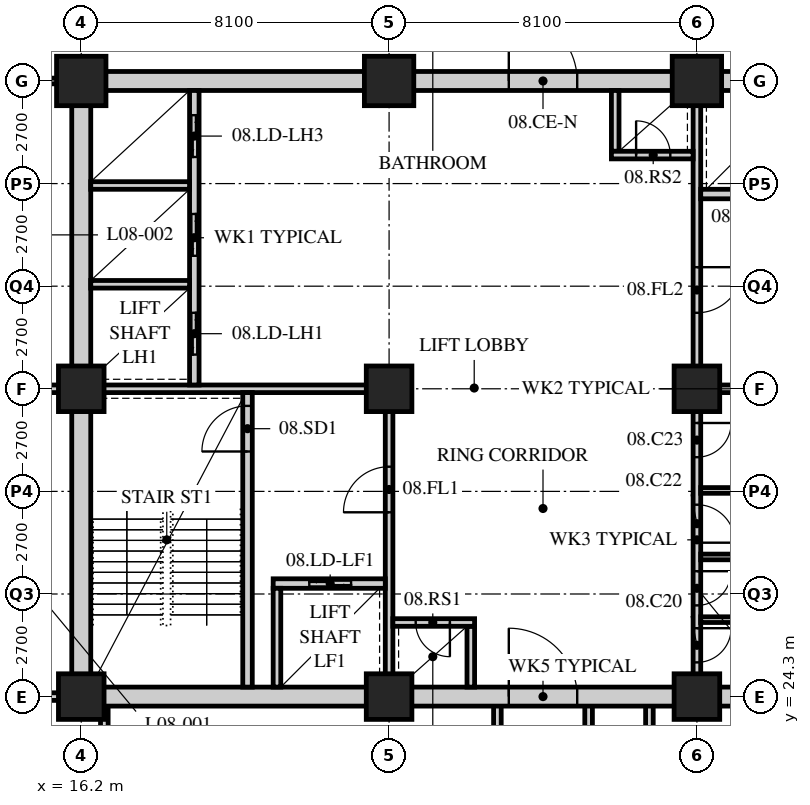
"""IFC4 building model, lengths in metres.
Left out: names, types, materials, properties, quantities, classifications, styles, units other than length and angle.
Written with IfcOpenShell. Run it as: python <this file> out.ifc"""

import sys

from ifc_helpers import new_model, si_unit, direction, frame, frame_2d, origin, origin_2d, place, context, subcontext, project, spatial, rectangle, hollow_rectangle, extrude, element, fill, save


model = new_model("IFC4")
c1 = context("Model", 3, precision=1e-05, world=origin(), true_north=direction((0.0, 1.0)))
c2 = subcontext(c1, "Body", "Model", "MODEL_VIEW")
j1 = project(units=[si_unit("LENGTHUNIT", "METRE"), si_unit("PLANEANGLEUNIT", "RADIAN")], contexts=[c1])
p1 = place(None, origin())
s1 = spatial("IfcSite", under=j1, at=p1, CompositionType="ELEMENT")
p2 = place(p1, origin())
s2 = spatial("IfcBuilding", under=s1, at=p2, CompositionType="ELEMENT")
p3 = place(p2, frame((0.0, 0.0, 39.8)))
s3 = spatial("IfcBuildingStorey", under=s2, at=p3, CompositionType="ELEMENT", Elevation=39.8)
for number, where, z_axis, x_axis in (
    (1, (16.2, 24.3, 0.0), (0.0, 0.0, 1.0), (1.0, 0.0, 0.0)),
    (2, (16.2, 32.4, 0.0), (0.0, 0.0, 1.0), (1.0, 0.0, 0.0)),
):
    element("IfcColumn", number, at=place(p3, frame(where, z_axis=z_axis, x_axis=x_axis)), inside=s3, PredefinedType="COLUMN", context=c2, shape_type="SweptSolid", body=[
        extrude(hollow_rectangle(XDim=1.2, YDim=1.2, WallThickness=0.12, at=origin_2d()), origin(), (0.0, 0.0, 1.0), 3.4),
    ])
p4 = place(p3, frame((16.2, 40.5, 0.0), z_axis=(0.0, 0.0, 1.0), x_axis=(1.0, 0.0, 0.0)))
e3 = element("IfcColumn", 3, at=p4, inside=s3, PredefinedType="COLUMN", context=c2, shape_type="SweptSolid", body=[
    extrude(hollow_rectangle(XDim=1.3, YDim=1.3, WallThickness=0.13, at=origin_2d()), origin(), (0.0, 0.0, 1.0), 3.4),
])
for number, where, z_axis, x_axis in (
    (4, (24.3, 24.3, 0.0), (0.0, 0.0, 1.0), (1.0, 0.0, 0.0)),
    (5, (24.3, 32.4, 0.0), (0.0, 0.0, 1.0), (1.0, 0.0, 0.0)),
):
    element("IfcColumn", number, at=place(p3, frame(where, z_axis=z_axis, x_axis=x_axis)), inside=s3, PredefinedType="COLUMN", context=c2, shape_type="SweptSolid", body=[
        extrude(hollow_rectangle(XDim=1.2, YDim=1.2, WallThickness=0.12, at=origin_2d()), origin(), (0.0, 0.0, 1.0), 3.4),
    ])
p5 = place(p3, frame((24.3, 40.5, 0.0), z_axis=(0.0, 0.0, 1.0), x_axis=(1.0, 0.0, 0.0)))
e6 = element("IfcColumn", 6, at=p5, inside=s3, PredefinedType="COLUMN", context=c2, shape_type="SweptSolid", body=[
    extrude(hollow_rectangle(XDim=1.3, YDim=1.3, WallThickness=0.13, at=origin_2d()), origin(), (0.0, 0.0, 1.0), 3.4),
])
for number, where, z_axis, x_axis in (
    (7, (32.4, 24.3, 0.0), (0.0, 0.0, 1.0), (1.0, 0.0, 0.0)),
    (8, (32.4, 32.4, 0.0), (0.0, 0.0, 1.0), (1.0, 0.0, 0.0)),
):
    element("IfcColumn", number, at=place(p3, frame(where, z_axis=z_axis, x_axis=x_axis)), inside=s3, PredefinedType="COLUMN", context=c2, shape_type="SweptSolid", body=[
        extrude(hollow_rectangle(XDim=1.2, YDim=1.2, WallThickness=0.12, at=origin_2d()), origin(), (0.0, 0.0, 1.0), 3.4),
    ])
p6 = place(p3, frame((32.4, 40.5, 0.0), z_axis=(0.0, 0.0, 1.0), x_axis=(1.0, 0.0, 0.0)))
e9 = element("IfcColumn", 9, at=p6, inside=s3, PredefinedType="COLUMN", context=c2, shape_type="SweptSolid", body=[
    extrude(hollow_rectangle(XDim=1.3, YDim=1.3, WallThickness=0.13, at=origin_2d()), origin(), (0.0, 0.0, 1.0), 3.4),
])
p7 = place(p3, frame((16.0, 40.5, 0.0), z_axis=(0.0, 0.0, 1.0), x_axis=(-1.0, 0.0, 0.0)))
e10 = element("IfcWall", 10, at=p7, inside=s3, PredefinedType="PARTITIONING", context=c2, shape_type="SweptSolid", body=[
    extrude(rectangle(XDim=2.05, YDim=0.15, at=frame_2d((1.025, 0.0))), origin(), (0.0, 0.0, 1.0), 2.578),
])
p8 = place(p3, frame((13.95, 32.4, 0.0), z_axis=(0.0, 0.0, 1.0), x_axis=(1.0, 0.0, 0.0)))
e11 = element("IfcWall", 11, at=p8, inside=s3, PredefinedType="SOLIDWALL", context=c2, shape_type="SweptSolid", body=[
    extrude(rectangle(XDim=2.25, YDim=0.2, at=frame_2d((1.125, 0.0))), origin(), (0.0, 0.0, 1.0), 2.578),
])
for number, where, z_axis, x_axis in (
    (12, (16.807, 18.0, 0.0), (0.0, 0.0, 1.0), (0.0, 1.0, 0.0)),
    (13, (31.15, 18.0, 0.0), (0.0, 0.0, 1.0), (0.0, 1.0, 0.0)),
    (14, (27.15, 18.0, 0.0), (0.0, 0.0, 1.0), (0.0, 1.0, 0.0)),
    (15, (29.55, 18.0, 0.0), (0.0, 0.0, 1.0), (0.0, 1.0, 0.0)),
):
    element("IfcWall", number, at=place(p3, frame(where, z_axis=z_axis, x_axis=x_axis)), inside=s3, PredefinedType="SOLIDWALL", context=c2, shape_type="SweptSolid", body=[
        extrude(rectangle(XDim=6.3, YDim=0.2, at=frame_2d((3.15, 0.0))), origin(), (0.0, 0.0, 1.0), 3.19),
    ])
p9 = place(p3, frame((13.95, 24.3, 0.0), z_axis=(0.0, 0.0, 1.0), x_axis=(1.0, 0.0, 0.0)))
e16 = element("IfcWall", 16, at=p9, inside=s3, PredefinedType="SOLIDWALL", context=c2, shape_type="SweptSolid", body=[
    extrude(rectangle(XDim=2.25, YDim=0.2, at=frame_2d((1.125, 0.0))), origin(), (0.0, 0.0, 1.0), 2.578),
])
p10 = place(p3, frame((15.95, 24.3, 0.0), z_axis=(0.0, 0.0, 1.0), x_axis=(1.0, 0.0, 0.0)))
e17 = element("IfcWall", 17, at=p10, inside=s3, PredefinedType="SOLIDWALL", context=c2, shape_type="SweptSolid", body=[
    extrude(rectangle(XDim=24.8, YDim=0.5, at=frame_2d((12.4, 0.0))), origin(), (0.0, 0.0, 1.0), 2.54),
])
p11 = place(p10, frame((11.5, 0.0, 0.0)))
e18 = element("IfcOpeningElement", 18, at=p11, cuts=e17, PredefinedType="OPENING", context=c2, shape_type="SweptSolid", body=[
    extrude(rectangle(XDim=1.8, YDim=2.4, at=frame_2d((0.9, 1.2))), frame((0.0, 0.26, 0.0), z_axis=(0.0, -1.0, 0.0), x_axis=(1.0, 0.0, 0.0)), (0.0, 0.0, 1.0), 0.52),
])
p12 = place(p3, frame((15.95, 40.5, 0.0), z_axis=(0.0, 0.0, 1.0), x_axis=(1.0, 0.0, 0.0)))
e19 = element("IfcWall", 19, at=p12, inside=s3, PredefinedType="SOLIDWALL", context=c2, shape_type="SweptSolid", body=[
    extrude(rectangle(XDim=24.8, YDim=0.5, at=frame_2d((12.4, 0.0))), origin(), (0.0, 0.0, 1.0), 2.54),
])
p13 = place(p12, frame((11.5, 0.0, 0.0)))
e20 = element("IfcOpeningElement", 20, at=p13, cuts=e19, PredefinedType="OPENING", context=c2, shape_type="SweptSolid", body=[
    extrude(rectangle(XDim=1.8, YDim=2.4, at=frame_2d((0.9, 1.2))), frame((0.0, 0.26, 0.0), z_axis=(0.0, -1.0, 0.0), x_axis=(1.0, 0.0, 0.0)), (0.0, 0.0, 1.0), 0.52),
])
p14 = place(p3, frame((16.2, 24.55, 0.0), z_axis=(0.0, 0.0, 1.0), x_axis=(0.0, 1.0, 0.0)))
e21 = element("IfcWall", 21, at=p14, inside=s3, PredefinedType="SOLIDWALL", context=c2, shape_type="SweptSolid", body=[
    extrude(rectangle(XDim=15.7, YDim=0.5, at=frame_2d((7.85, 0.0))), origin(), (0.0, 0.0, 1.0), 2.578),
])
p15 = place(p3, frame((16.45, 32.4, 0.0), z_axis=(0.0, 0.0, 1.0), x_axis=(1.0, 0.0, 0.0)))
e22 = element("IfcWall", 22, at=p15, inside=s3, PredefinedType="SOLIDWALL", context=c2, shape_type="SweptSolid", body=[
    extrude(rectangle(XDim=7.95, YDim=0.2, at=frame_2d((3.975, 0.0))), origin(), (0.0, 0.0, 1.0), 2.578),
])
p16 = place(p3, frame((24.3, 24.55, 0.0), z_axis=(0.0, 0.0, 1.0), x_axis=(0.0, 1.0, 0.0)))
e23 = element("IfcWall", 23, at=p16, inside=s3, PredefinedType="SOLIDWALL", context=c2, shape_type="SweptSolid", body=[
    extrude(rectangle(XDim=7.75, YDim=0.2, at=frame_2d((3.875, 0.0))), origin(), (0.0, 0.0, 1.0), 2.578),
])
p17 = place(p16, frame((4.6, 0.0, 0.0)))
e24 = element("IfcOpeningElement", 24, at=p17, cuts=e23, PredefinedType="OPENING", context=c2, shape_type="SweptSolid", body=[
    extrude(rectangle(XDim=1.2, YDim=2.1, at=frame_2d((0.6, 1.05))), frame((0.0, 0.11, 0.0), z_axis=(0.0, -1.0, 0.0), x_axis=(1.0, 0.0, 0.0)), (0.0, 0.0, 1.0), 0.22),
])
p18 = place(p3, frame((20.575, 24.55, 0.0), z_axis=(0.0, 0.0, 1.0), x_axis=(0.0, 1.0, 0.0)))
e25 = element("IfcWall", 25, at=p18, inside=s3, PredefinedType="SOLIDWALL", context=c2, shape_type="SweptSolid", body=[
    extrude(rectangle(XDim=7.75, YDim=0.25, at=frame_2d((3.875, 0.0))), origin(), (0.0, 0.0, 1.0), 3.19),
])
p19 = place(p18, frame((6.2, 0.0, 0.0)))
e26 = element("IfcOpeningElement", 26, at=p19, cuts=e25, PredefinedType="OPENING", context=c2, shape_type="SweptSolid", body=[
    extrude(rectangle(XDim=1.2, YDim=2.1, at=frame_2d((0.6, 1.05))), frame((0.0, 0.135, 0.0), z_axis=(0.0, -1.0, 0.0), x_axis=(1.0, 0.0, 0.0)), (0.0, 0.0, 1.0), 0.27),
])
p20 = place(p3, frame((21.25, 27.275, 0.0), z_axis=(0.0, 0.0, 1.0), x_axis=(1.0, 0.0, 0.0)))
e27 = element("IfcWall", 27, at=p20, inside=s3, PredefinedType="SOLIDWALL", context=c2, shape_type="SweptSolid", body=[
    extrude(rectangle(XDim=2.95, YDim=0.25, at=frame_2d((1.475, 0.0))), origin(), (0.0, 0.0, 1.0), 3.19),
])
p21 = place(p20, frame((0.95, 0.0, 0.0)))
e28 = element("IfcOpeningElement", 28, at=p21, cuts=e27, PredefinedType="OPENING", context=c2, shape_type="SweptSolid", body=[
    extrude(rectangle(XDim=1.1, YDim=2.4, at=frame_2d((0.55, 1.2))), frame((0.0, 0.135, 0.0), z_axis=(0.0, -1.0, 0.0), x_axis=(1.0, 0.0, 0.0)), (0.0, 0.0, 1.0), 0.27),
])
p22 = place(p3, frame((21.35, 24.55, 0.0), z_axis=(0.0, 0.0, 1.0), x_axis=(0.0, 1.0, 0.0)))
e29 = element("IfcWall", 29, at=p22, inside=s3, PredefinedType="SOLIDWALL", context=c2, shape_type="SweptSolid", body=[
    extrude(rectangle(XDim=2.6, YDim=0.2, at=frame_2d((1.3, 0.0))), origin(), (0.0, 0.0, 1.0), 3.19),
])
p23 = place(p3, frame((19.175, 32.5, 0.0), z_axis=(0.0, 0.0, 1.0), x_axis=(0.0, 1.0, 0.0)))
e30 = element("IfcWall", 30, at=p23, inside=s3, PredefinedType="SOLIDWALL", context=c2, shape_type="SweptSolid", body=[
    extrude(rectangle(XDim=7.75, YDim=0.25, at=frame_2d((3.875, 0.0))), origin(), (0.0, 0.0, 1.0), 3.19),
])
p24 = place(p23, frame((0.8, 0.0, 0.0)))
e31 = element("IfcOpeningElement", 31, at=p24, cuts=e30, PredefinedType="OPENING", context=c2, shape_type="SweptSolid", body=[
    extrude(rectangle(XDim=1.1, YDim=2.4, at=frame_2d((0.55, 1.2))), frame((0.0, 0.135, 0.0), z_axis=(0.0, -1.0, 0.0), x_axis=(1.0, 0.0, 0.0)), (0.0, 0.0, 1.0), 0.27),
])
p25 = place(p23, frame((3.4, 0.0, 0.0)))
e32 = element("IfcOpeningElement", 32, at=p25, cuts=e30, PredefinedType="OPENING", context=c2, shape_type="SweptSolid", body=[
    extrude(rectangle(XDim=1.1, YDim=2.4, at=frame_2d((0.55, 1.2))), frame((0.0, 0.135, 0.0), z_axis=(0.0, -1.0, 0.0), x_axis=(1.0, 0.0, 0.0)), (0.0, 0.0, 1.0), 0.27),
])
p26 = place(p23, frame((6.0, 0.0, 0.0)))
e33 = element("IfcOpeningElement", 33, at=p26, cuts=e30, PredefinedType="OPENING", context=c2, shape_type="SweptSolid", body=[
    extrude(rectangle(XDim=1.1, YDim=2.4, at=frame_2d((0.55, 1.2))), frame((0.0, 0.135, 0.0), z_axis=(0.0, -1.0, 0.0), x_axis=(1.0, 0.0, 0.0)), (0.0, 0.0, 1.0), 0.27),
])
for number, where, z_axis, x_axis in (
    (34, (16.45, 35.15, 0.0), (0.0, 0.0, 1.0), (1.0, 0.0, 0.0)),
    (35, (16.45, 37.75, 0.0), (0.0, 0.0, 1.0), (1.0, 0.0, 0.0)),
):
    element("IfcWall", number, at=place(p3, frame(where, z_axis=z_axis, x_axis=x_axis)), inside=s3, PredefinedType="SOLIDWALL", context=c2, shape_type="SweptSolid", body=[
        extrude(rectangle(XDim=2.6, YDim=0.2, at=frame_2d((1.3, 0.0))), origin(), (0.0, 0.0, 1.0), 3.19),
    ])
p27 = place(p3, frame((26.45, 24.55, 0.0), z_axis=(0.0, 0.0, 1.0), x_axis=(0.0, 1.0, 0.0)))
e36 = element("IfcWall", 36, at=p27, inside=s3, PredefinedType="SOLIDWALL", context=c2, shape_type="SweptSolid", body=[
    extrude(rectangle(XDim=1.6, YDim=0.2, at=frame_2d((0.8, 0.0))), origin(), (0.0, 0.0, 1.0), 3.19),
])
p28 = place(p3, frame((24.4, 26.25, 0.0), z_axis=(0.0, 0.0, 1.0), x_axis=(1.0, 0.0, 0.0)))
e37 = element("IfcWall", 37, at=p28, inside=s3, PredefinedType="SOLIDWALL", context=c2, shape_type="SweptSolid", body=[
    extrude(rectangle(XDim=2.15, YDim=0.2, at=frame_2d((1.075, 0.0))), origin(), (0.0, 0.0, 1.0), 3.19),
])
p29 = place(p28, frame((0.6, 0.0, 0.0)))
e38 = element("IfcOpeningElement", 38, at=p29, cuts=e37, PredefinedType="OPENING", context=c2, shape_type="SweptSolid", body=[
    extrude(rectangle(XDim=0.9, YDim=2.1, at=frame_2d((0.45, 1.05))), frame((0.0, 0.11, 0.0), z_axis=(0.0, -1.0, 0.0), x_axis=(1.0, 0.0, 0.0)), (0.0, 0.0, 1.0), 0.22),
])
p30 = place(p3, frame((32.3, 32.4, 0.0), z_axis=(0.0, 0.0, 1.0), x_axis=(1.0, 0.0, 0.0)))
e39 = element("IfcWall", 39, at=p30, inside=s3, PredefinedType="SOLIDWALL", context=c2, shape_type="SweptSolid", body=[
    extrude(rectangle(XDim=7.95, YDim=0.2, at=frame_2d((3.975, 0.0))), origin(), (0.0, 0.0, 1.0), 2.578),
])
p31 = place(p3, frame((32.4, 32.5, 0.0), z_axis=(0.0, 0.0, 1.0), x_axis=(0.0, 1.0, 0.0)))
e40 = element("IfcWall", 40, at=p31, inside=s3, PredefinedType="SOLIDWALL", context=c2, shape_type="SweptSolid", body=[
    extrude(rectangle(XDim=7.75, YDim=0.2, at=frame_2d((3.875, 0.0))), origin(), (0.0, 0.0, 1.0), 2.578),
])
p32 = place(p31, frame((1.9, 0.0, 0.0)))
e41 = element("IfcOpeningElement", 41, at=p32, cuts=e40, PredefinedType="OPENING", context=c2, shape_type="SweptSolid", body=[
    extrude(rectangle(XDim=1.2, YDim=2.1, at=frame_2d((0.6, 1.05))), frame((0.0, 0.11, 0.0), z_axis=(0.0, -1.0, 0.0), x_axis=(1.0, 0.0, 0.0)), (0.0, 0.0, 1.0), 0.22),
])
p33 = place(p3, frame((32.5, 37.525, 0.0), z_axis=(0.0, 0.0, 1.0), x_axis=(1.0, 0.0, 0.0)))
e42 = element("IfcWall", 42, at=p33, inside=s3, PredefinedType="SOLIDWALL", context=c2, shape_type="SweptSolid", body=[
    extrude(rectangle(XDim=2.95, YDim=0.25, at=frame_2d((1.475, 0.0))), origin(), (0.0, 0.0, 1.0), 3.19),
])
p34 = place(p33, frame((0.9, 0.0, 0.0)))
e43 = element("IfcOpeningElement", 43, at=p34, cuts=e42, PredefinedType="OPENING", context=c2, shape_type="SweptSolid", body=[
    extrude(rectangle(XDim=1.1, YDim=2.4, at=frame_2d((0.55, 1.2))), frame((0.0, 0.135, 0.0), z_axis=(0.0, -1.0, 0.0), x_axis=(1.0, 0.0, 0.0)), (0.0, 0.0, 1.0), 0.27),
])
p35 = place(p3, frame((30.25, 38.65, 0.0), z_axis=(0.0, 0.0, 1.0), x_axis=(0.0, 1.0, 0.0)))
e44 = element("IfcWall", 44, at=p35, inside=s3, PredefinedType="SOLIDWALL", context=c2, shape_type="SweptSolid", body=[
    extrude(rectangle(XDim=1.6, YDim=0.2, at=frame_2d((0.8, 0.0))), origin(), (0.0, 0.0, 1.0), 3.19),
])
p36 = place(p3, frame((30.15, 38.55, 0.0), z_axis=(0.0, 0.0, 1.0), x_axis=(1.0, 0.0, 0.0)))
e45 = element("IfcWall", 45, at=p36, inside=s3, PredefinedType="SOLIDWALL", context=c2, shape_type="SweptSolid", body=[
    extrude(rectangle(XDim=2.15, YDim=0.2, at=frame_2d((1.075, 0.0))), origin(), (0.0, 0.0, 1.0), 3.19),
])
p37 = place(p36, frame((0.65, 0.0, 0.0)))
e46 = element("IfcOpeningElement", 46, at=p37, cuts=e45, PredefinedType="OPENING", context=c2, shape_type="SweptSolid", body=[
    extrude(rectangle(XDim=0.9, YDim=2.1, at=frame_2d((0.45, 1.05))), frame((0.0, 0.11, 0.0), z_axis=(0.0, -1.0, 0.0), x_axis=(1.0, 0.0, 0.0)), (0.0, 0.0, 1.0), 0.22),
])
p38 = place(p3, frame((32.4, 24.55, 0.0), z_axis=(0.0, 0.0, 1.0), x_axis=(0.0, 1.0, 0.0)))
e47 = element("IfcWall", 47, at=p38, inside=s3, PredefinedType="PARTITIONING", context=c2, shape_type="SweptSolid", body=[
    extrude(rectangle(XDim=7.75, YDim=0.2, at=frame_2d((3.875, 0.0))), origin(), (0.0, 0.0, 1.0), 2.578),
])
p39 = place(p38, frame((0.65, 0.0, 0.0)))
e48 = element("IfcOpeningElement", 48, at=p39, cuts=e47, PredefinedType="OPENING", context=c2, shape_type="SweptSolid", body=[
    extrude(rectangle(XDim=0.9, YDim=2.1, at=frame_2d((0.45, 1.05))), frame((0.0, 0.11, 0.0), z_axis=(0.0, -1.0, 0.0), x_axis=(1.0, 0.0, 0.0)), (0.0, 0.0, 1.0), 0.22),
])
p40 = place(p38, frame((2.15, 0.0, 0.0)))
e49 = element("IfcOpeningElement", 49, at=p40, cuts=e47, PredefinedType="OPENING", context=c2, shape_type="SweptSolid", body=[
    extrude(rectangle(XDim=0.9, YDim=2.1, at=frame_2d((0.45, 1.05))), frame((0.0, 0.11, 0.0), z_axis=(0.0, -1.0, 0.0), x_axis=(1.0, 0.0, 0.0)), (0.0, 0.0, 1.0), 0.22),
])
p41 = place(p38, frame((3.8, 0.0, 0.0)))
e50 = element("IfcOpeningElement", 50, at=p41, cuts=e47, PredefinedType="OPENING", context=c2, shape_type="SweptSolid", body=[
    extrude(rectangle(XDim=1.0, YDim=2.1, at=frame_2d((0.5, 1.05))), frame((0.0, 0.11, 0.0), z_axis=(0.0, -1.0, 0.0), x_axis=(1.0, 0.0, 0.0)), (0.0, 0.0, 1.0), 0.22),
])
p42 = place(p38, frame((6.05, 0.0, 0.0)))
e51 = element("IfcOpeningElement", 51, at=p42, cuts=e47, PredefinedType="OPENING", context=c2, shape_type="SweptSolid", body=[
    extrude(rectangle(XDim=0.9, YDim=2.1, at=frame_2d((0.45, 1.05))), frame((0.0, 0.11, 0.0), z_axis=(0.0, -1.0, 0.0), x_axis=(1.0, 0.0, 0.0)), (0.0, 0.0, 1.0), 0.22),
])
for number, where, z_axis, x_axis in (
    (52, (32.5, 26.325, 0.0), (0.0, 0.0, 1.0), (1.0, 0.0, 0.0)),
    (53, (32.5, 27.975, 0.0), (0.0, 0.0, 1.0), (1.0, 0.0, 0.0)),
):
    element("IfcWall", number, at=place(p3, frame(where, z_axis=z_axis, x_axis=x_axis)), inside=s3, PredefinedType="PARTITIONING", context=c2, shape_type="SweptSolid", body=[
        extrude(rectangle(XDim=2.55, YDim=0.15, at=frame_2d((1.275, 0.0))), origin(), (0.0, 0.0, 1.0), 3.19),
    ])
p43 = place(p3, frame((32.5, 29.725, 0.0), z_axis=(0.0, 0.0, 1.0), x_axis=(1.0, 0.0, 0.0)))
e54 = element("IfcWall", 54, at=p43, inside=s3, PredefinedType="PARTITIONING", context=c2, shape_type="SweptSolid", body=[
    extrude(rectangle(XDim=2.4, YDim=0.15, at=frame_2d((1.2, 0.0))), origin(), (0.0, 0.0, 1.0), 3.19),
])
p44 = place(p39, origin())
e55 = element("IfcDoor", 55, at=p44, inside=s3, OperationType="SINGLE_SWING_LEFT", PredefinedType="DOOR", context=c2, shape_type="SweptSolid", body=[
    extrude(rectangle(XDim=0.9, YDim=2.1, at=frame_2d((0.45, 1.05))), frame((0.0, 0.025, 0.0), z_axis=(0.0, -1.0, 0.0), x_axis=(1.0, 0.0, 0.0)), (0.0, 0.0, 1.0), 0.05),
])
fill(e48, e55)
p45 = place(p40, origin())
e56 = element("IfcDoor", 56, at=p45, inside=s3, OperationType="SINGLE_SWING_LEFT", PredefinedType="DOOR", context=c2, shape_type="SweptSolid", body=[
    extrude(rectangle(XDim=0.9, YDim=2.1, at=frame_2d((0.45, 1.05))), frame((0.0, 0.025, 0.0), z_axis=(0.0, -1.0, 0.0), x_axis=(1.0, 0.0, 0.0)), (0.0, 0.0, 1.0), 0.05),
])
fill(e49, e56)
p46 = place(p41, origin())
e57 = element("IfcDoor", 57, at=p46, inside=s3, OperationType="SINGLE_SWING_RIGHT", PredefinedType="DOOR", context=c2, shape_type="SweptSolid", body=[
    extrude(rectangle(XDim=1.0, YDim=2.1, at=frame_2d((0.5, 1.05))), frame((0.0, 0.025, 0.0), z_axis=(0.0, -1.0, 0.0), x_axis=(1.0, 0.0, 0.0)), (0.0, 0.0, 1.0), 0.05),
])
fill(e50, e57)
p47 = place(p42, origin())
e58 = element("IfcDoor", 58, at=p47, inside=s3, OperationType="SINGLE_SWING_LEFT", PredefinedType="DOOR", context=c2, shape_type="SweptSolid", body=[
    extrude(rectangle(XDim=0.9, YDim=2.1, at=frame_2d((0.45, 1.05))), frame((0.0, 0.025, 0.0), z_axis=(0.0, -1.0, 0.0), x_axis=(1.0, 0.0, 0.0)), (0.0, 0.0, 1.0), 0.05),
])
fill(e51, e58)
p48 = place(p19, origin())
e59 = element("IfcDoor", 59, at=p48, inside=s3, OperationType="SINGLE_SWING_LEFT", PredefinedType="DOOR", context=c2, shape_type="SweptSolid", body=[
    extrude(rectangle(XDim=1.2, YDim=2.1, at=frame_2d((0.6, 1.05))), frame((0.0, 0.025, 0.0), z_axis=(0.0, -1.0, 0.0), x_axis=(1.0, 0.0, 0.0)), (0.0, 0.0, 1.0), 0.05),
])
fill(e26, e59)
p49 = place(p17, origin())
e60 = element("IfcDoor", 60, at=p49, inside=s3, OperationType="SINGLE_SWING_LEFT", PredefinedType="DOOR", context=c2, shape_type="SweptSolid", body=[
    extrude(rectangle(XDim=1.2, YDim=2.1, at=frame_2d((0.6, 1.05))), frame((0.0, 0.025, 0.0), z_axis=(0.0, -1.0, 0.0), x_axis=(1.0, 0.0, 0.0)), (0.0, 0.0, 1.0), 0.05),
])
fill(e24, e60)
p50 = place(p29, origin())
e61 = element("IfcDoor", 61, at=p50, inside=s3, OperationType="SINGLE_SWING_LEFT", PredefinedType="DOOR", context=c2, shape_type="SweptSolid", body=[
    extrude(rectangle(XDim=0.9, YDim=2.1, at=frame_2d((0.45, 1.05))), frame((0.0, 0.025, 0.0), z_axis=(0.0, -1.0, 0.0), x_axis=(1.0, 0.0, 0.0)), (0.0, 0.0, 1.0), 0.05),
])
fill(e38, e61)
p51 = place(p32, origin())
e62 = element("IfcDoor", 62, at=p51, inside=s3, OperationType="SINGLE_SWING_LEFT", PredefinedType="DOOR", context=c2, shape_type="SweptSolid", body=[
    extrude(rectangle(XDim=1.2, YDim=2.1, at=frame_2d((0.6, 1.05))), frame((0.0, 0.025, 0.0), z_axis=(0.0, -1.0, 0.0), x_axis=(1.0, 0.0, 0.0)), (0.0, 0.0, 1.0), 0.05),
])
fill(e41, e62)
p52 = place(p37, origin())
e63 = element("IfcDoor", 63, at=p52, inside=s3, OperationType="SINGLE_SWING_LEFT", PredefinedType="DOOR", context=c2, shape_type="SweptSolid", body=[
    extrude(rectangle(XDim=0.9, YDim=2.1, at=frame_2d((0.45, 1.05))), frame((0.0, 0.025, 0.0), z_axis=(0.0, -1.0, 0.0), x_axis=(1.0, 0.0, 0.0)), (0.0, 0.0, 1.0), 0.05),
])
fill(e46, e63)
p53 = place(p24, origin())
e64 = element("IfcDoor", 64, at=p53, inside=s3, OperationType="DOUBLE_DOOR_SLIDING", PredefinedType="DOOR", context=c2, shape_type="SweptSolid", body=[
    extrude(rectangle(XDim=1.1, YDim=2.4, at=frame_2d((0.55, 1.2))), frame((0.0, 0.025, 0.0), z_axis=(0.0, -1.0, 0.0), x_axis=(1.0, 0.0, 0.0)), (0.0, 0.0, 1.0), 0.05),
])
fill(e31, e64)
p54 = place(p25, origin())
e65 = element("IfcDoor", 65, at=p54, inside=s3, OperationType="DOUBLE_DOOR_SLIDING", PredefinedType="DOOR", context=c2, shape_type="SweptSolid", body=[
    extrude(rectangle(XDim=1.1, YDim=2.4, at=frame_2d((0.55, 1.2))), frame((0.0, 0.025, 0.0), z_axis=(0.0, -1.0, 0.0), x_axis=(1.0, 0.0, 0.0)), (0.0, 0.0, 1.0), 0.05),
])
fill(e32, e65)
p55 = place(p26, origin())
e66 = element("IfcDoor", 66, at=p55, inside=s3, OperationType="DOUBLE_DOOR_SLIDING", PredefinedType="DOOR", context=c2, shape_type="SweptSolid", body=[
    extrude(rectangle(XDim=1.1, YDim=2.4, at=frame_2d((0.55, 1.2))), frame((0.0, 0.025, 0.0), z_axis=(0.0, -1.0, 0.0), x_axis=(1.0, 0.0, 0.0)), (0.0, 0.0, 1.0), 0.05),
])
fill(e33, e66)
p56 = place(p21, origin())
e67 = element("IfcDoor", 67, at=p56, inside=s3, OperationType="DOUBLE_DOOR_SLIDING", PredefinedType="DOOR", context=c2, shape_type="SweptSolid", body=[
    extrude(rectangle(XDim=1.1, YDim=2.4, at=frame_2d((0.55, 1.2))), frame((0.0, 0.025, 0.0), z_axis=(0.0, -1.0, 0.0), x_axis=(1.0, 0.0, 0.0)), (0.0, 0.0, 1.0), 0.05),
])
fill(e28, e67)
p57 = place(p11, origin())
e68 = element("IfcDoor", 68, at=p57, inside=s3, OperationType="DOUBLE_DOOR_SINGLE_SWING", PredefinedType="DOOR", context=c2, shape_type="SweptSolid", body=[
    extrude(rectangle(XDim=1.8, YDim=2.4, at=frame_2d((0.9, 1.2))), frame((0.0, 0.025, 0.0), z_axis=(0.0, -1.0, 0.0), x_axis=(1.0, 0.0, 0.0)), (0.0, 0.0, 1.0), 0.05),
])
fill(e18, e68)
p58 = place(p13, origin())
e69 = element("IfcDoor", 69, at=p58, inside=s3, OperationType="DOUBLE_DOOR_SINGLE_SWING", PredefinedType="DOOR", context=c2, shape_type="SweptSolid", body=[
    extrude(rectangle(XDim=1.8, YDim=2.4, at=frame_2d((0.9, 1.2))), frame((0.0, 0.025, 0.0), z_axis=(0.0, -1.0, 0.0), x_axis=(1.0, 0.0, 0.0)), (0.0, 0.0, 1.0), 0.05),
])
fill(e20, e69)
save(model, sys.argv[1])
